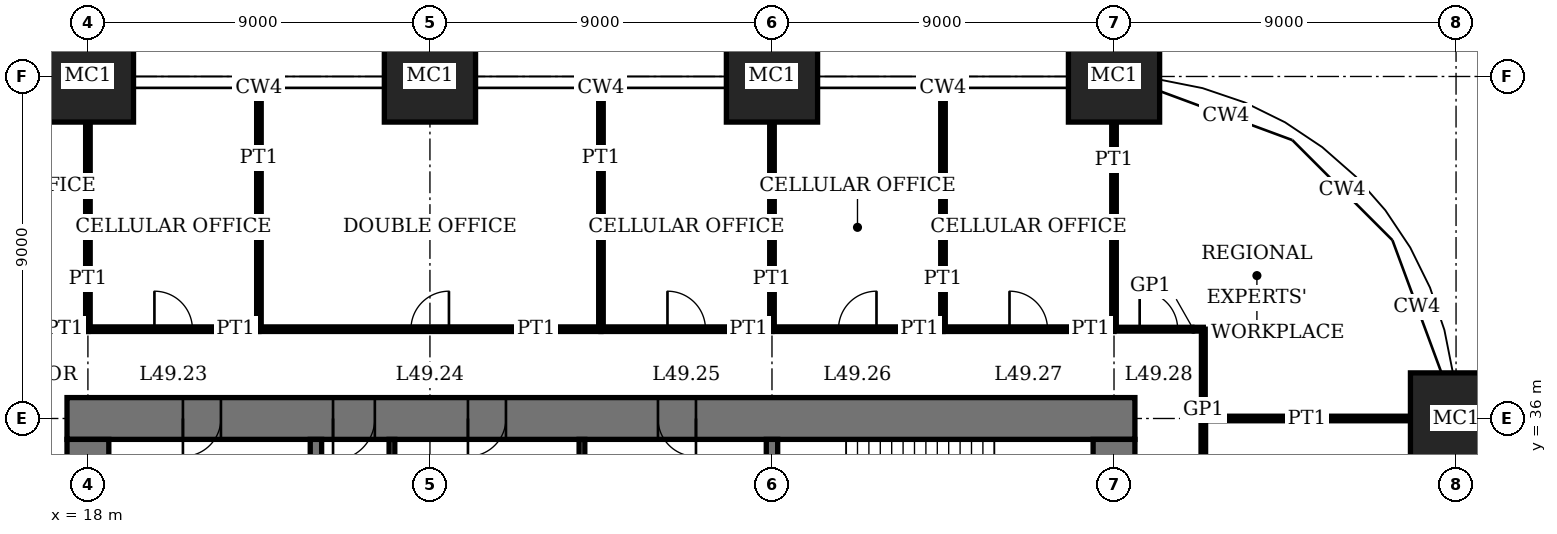
"""IFC4 building model, lengths in metres.
Left out: names, types, materials, properties, quantities, classifications, styles, units other than length and angle.
Written with IfcOpenShell. Run it as: python <this file> out.ifc"""

import sys

from ifc_helpers import new_model, si_unit, direction, frame, frame_2d, origin, origin_2d, place, context, subcontext, project, spatial, rectangle, extrude, element, fill, save


model = new_model("IFC4")
c1 = context("Model", 3, precision=1e-05, world=origin(), true_north=direction((0.0, 1.0)))
c2 = subcontext(c1, "Body", "Model", "MODEL_VIEW")
j1 = project(units=[si_unit("LENGTHUNIT", "METRE"), si_unit("PLANEANGLEUNIT", "RADIAN")], contexts=[c1])
p1 = place(None, origin())
s1 = spatial("IfcSite", under=j1, at=p1, CompositionType="ELEMENT")
p2 = place(p1, origin())
s2 = spatial("IfcBuilding", under=s1, at=p2, CompositionType="ELEMENT")
p3 = place(p2, frame((0.0, 0.0, 202.2)))
s3 = spatial("IfcBuildingStorey", under=s2, at=p3, CompositionType="ELEMENT", Elevation=202.2)
for number, where, z_axis, x_axis in (
    (1, (18.0, 45.0, 0.0), (0.0, 0.0, 1.0), (1.0, 0.0, 0.0)),
    (2, (27.0, 45.0, 0.0), (0.0, 0.0, 1.0), (1.0, 0.0, 0.0)),
    (3, (36.0, 45.0, 0.0), (0.0, 0.0, 1.0), (1.0, 0.0, 0.0)),
    (4, (45.0, 45.0, 0.0), (0.0, 0.0, 1.0), (1.0, 0.0, 0.0)),
    (5, (54.0, 36.0, 0.0), (0.0, 0.0, 1.0), (1.0, 0.0, 0.0)),
):
    element("IfcColumn", number, at=place(p3, frame(where, z_axis=z_axis, x_axis=x_axis)), inside=s3, PredefinedType="COLUMN", context=c2, shape_type="SweptSolid", body=[
        extrude(rectangle(XDim=2.4, YDim=2.4, at=origin_2d()), origin(), (0.0, 0.0, 1.0), 4.0),
    ])
p4 = place(p3, frame((45.55, 36.0, 0.0), z_axis=(0.0, 0.0, 1.0), x_axis=(-1.0, 0.0, 0.0)))
e6 = element("IfcWall", 6, at=p4, inside=s3, PredefinedType="SHEAR", context=c2, shape_type="SweptSolid", body=[
    extrude(rectangle(XDim=28.1, YDim=1.1, at=frame_2d((14.05, 0.0))), origin(), (0.0, 0.0, 1.0), 4.0),
])
p5 = place(p4, frame((11.55, 0.0, 0.0)))
e7 = element("IfcOpeningElement", 7, at=p5, cuts=e6, PredefinedType="OPENING", context=c2, shape_type="SweptSolid", body=[
    extrude(rectangle(XDim=1.0, YDim=2.4, at=frame_2d((0.5, 1.2))), frame((0.0, 0.56, 0.0), z_axis=(0.0, -1.0, 0.0), x_axis=(1.0, 0.0, 0.0)), (0.0, 0.0, 1.0), 1.12),
])
p6 = place(p4, frame((16.55, 0.0, 0.0)))
e8 = element("IfcOpeningElement", 8, at=p6, cuts=e6, PredefinedType="OPENING", context=c2, shape_type="SweptSolid", body=[
    extrude(rectangle(XDim=1.0, YDim=2.4, at=frame_2d((0.5, 1.2))), frame((0.0, 0.56, 0.0), z_axis=(0.0, -1.0, 0.0), x_axis=(1.0, 0.0, 0.0)), (0.0, 0.0, 1.0), 1.12),
])
p7 = place(p4, frame((20.0, 0.0, 0.0)))
e9 = element("IfcOpeningElement", 9, at=p7, cuts=e6, PredefinedType="OPENING", context=c2, shape_type="SweptSolid", body=[
    extrude(rectangle(XDim=1.1, YDim=2.4, at=frame_2d((0.55, 1.2))), frame((0.0, 0.56, 0.0), z_axis=(0.0, -1.0, 0.0), x_axis=(1.0, 0.0, 0.0)), (0.0, 0.0, 1.0), 1.12),
])
p8 = place(p4, frame((24.05, 0.0, 0.0)))
e10 = element("IfcOpeningElement", 10, at=p8, cuts=e6, PredefinedType="OPENING", context=c2, shape_type="SweptSolid", body=[
    extrude(rectangle(XDim=1.0, YDim=2.4, at=frame_2d((0.5, 1.2))), frame((0.0, 0.56, 0.0), z_axis=(0.0, -1.0, 0.0), x_axis=(1.0, 0.0, 0.0)), (0.0, 0.0, 1.0), 1.12),
])
p9 = place(p3, frame((18.0, 35.45, 0.0), z_axis=(0.0, 0.0, 1.0), x_axis=(0.0, -1.0, 0.0)))
e11 = element("IfcWall", 11, at=p9, inside=s3, PredefinedType="SHEAR", context=c2, shape_type="SweptSolid", body=[
    extrude(rectangle(XDim=16.9, YDim=1.1, at=frame_2d((8.45, 0.0))), origin(), (0.0, 0.0, 1.0), 4.0),
])
p10 = place(p9, frame((8.45, 0.0, 0.0)))
e12 = element("IfcOpeningElement", 12, at=p10, cuts=e11, PredefinedType="OPENING", context=c2, shape_type="SweptSolid", body=[
    extrude(rectangle(XDim=1.8, YDim=2.4, at=frame_2d((0.9, 1.2))), frame((0.0, 0.56, 0.0), z_axis=(0.0, -1.0, 0.0), x_axis=(1.0, 0.0, 0.0)), (0.0, 0.0, 1.0), 1.12),
])
p11 = place(p3, frame((45.0, 18.55, 0.0), z_axis=(0.0, 0.0, 1.0), x_axis=(0.0, 1.0, 0.0)))
e13 = element("IfcWall", 13, at=p11, inside=s3, PredefinedType="SHEAR", context=c2, shape_type="SweptSolid", body=[
    extrude(rectangle(XDim=16.9, YDim=1.1, at=frame_2d((8.45, 0.0))), origin(), (0.0, 0.0, 1.0), 4.0),
])
p12 = place(p11, frame((8.45, 0.0, 0.0)))
e14 = element("IfcOpeningElement", 14, at=p12, cuts=e13, PredefinedType="OPENING", context=c2, shape_type="SweptSolid", body=[
    extrude(rectangle(XDim=1.8, YDim=2.4, at=frame_2d((0.9, 1.2))), frame((0.0, 0.56, 0.0), z_axis=(0.0, -1.0, 0.0), x_axis=(1.0, 0.0, 0.0)), (0.0, 0.0, 1.0), 1.12),
])
p13 = place(p3, frame((36.0, 32.4, 0.0), z_axis=(0.0, 0.0, 1.0), x_axis=(0.0, 1.0, 0.0)))
e15 = element("IfcWall", 15, at=p13, inside=s3, PredefinedType="SHEAR", context=c2, shape_type="SweptSolid", body=[
    extrude(rectangle(XDim=3.05, YDim=0.3, at=frame_2d((1.525, 0.0))), origin(), (0.0, 0.0, 1.0), 4.0),
])
p14 = place(p3, frame((24.0, 29.55, 0.0), z_axis=(0.0, 0.0, 1.0), x_axis=(0.0, 1.0, 0.0)))
e16 = element("IfcWall", 16, at=p14, inside=s3, PredefinedType="SHEAR", context=c2, shape_type="SweptSolid", body=[
    extrude(rectangle(XDim=5.9, YDim=0.3, at=frame_2d((2.95, 0.0))), origin(), (0.0, 0.0, 1.0), 4.0),
])
p15 = place(p3, frame((47.35, 36.0, 0.0), z_axis=(0.0, 0.0, 1.0), x_axis=(1.0, 0.0, 0.0)))
e17 = element("IfcWall", 17, at=p15, inside=s3, PredefinedType="PARTITIONING", context=c2, shape_type="SweptSolid", body=[
    extrude(rectangle(XDim=5.45, YDim=0.12, at=frame_2d((2.725, 0.0))), origin(), (0.0, 0.0, 1.0), 3.05),
])
p16 = place(p3, frame((13.25, 38.35, 0.0), z_axis=(0.0, 0.0, 1.0), x_axis=(1.0, 0.0, 0.0)))
e18 = element("IfcWall", 18, at=p16, inside=s3, PredefinedType="PARTITIONING", context=c2, shape_type="SweptSolid", body=[
    extrude(rectangle(XDim=4.75, YDim=0.12, at=frame_2d((2.375, 0.0))), origin(), (0.0, 0.0, 1.0), 3.75),
])
p17 = place(p16, frame((1.875, 0.0, 0.0)))
e19 = element("IfcOpeningElement", 19, at=p17, cuts=e18, PredefinedType="OPENING", context=c2, shape_type="SweptSolid", body=[
    extrude(rectangle(XDim=1.0, YDim=2.4, at=frame_2d((0.5, 1.2))), frame((0.0, 0.07, 0.0), z_axis=(0.0, -1.0, 0.0), x_axis=(1.0, 0.0, 0.0)), (0.0, 0.0, 1.0), 0.14),
])
p18 = place(p3, frame((18.0, 38.35, 0.0), z_axis=(0.0, 0.0, 1.0), x_axis=(1.0, 0.0, 0.0)))
e20 = element("IfcWall", 20, at=p18, inside=s3, PredefinedType="PARTITIONING", context=c2, shape_type="SweptSolid", body=[
    extrude(rectangle(XDim=4.5, YDim=0.12, at=frame_2d((2.25, 0.0))), origin(), (0.0, 0.0, 1.0), 3.75),
])
p19 = place(p18, frame((1.75, 0.0, 0.0)))
e21 = element("IfcOpeningElement", 21, at=p19, cuts=e20, PredefinedType="OPENING", context=c2, shape_type="SweptSolid", body=[
    extrude(rectangle(XDim=1.0, YDim=2.4, at=frame_2d((0.5, 1.2))), frame((0.0, 0.07, 0.0), z_axis=(0.0, -1.0, 0.0), x_axis=(1.0, 0.0, 0.0)), (0.0, 0.0, 1.0), 0.14),
])
p20 = place(p3, frame((22.5, 38.35, 0.0), z_axis=(0.0, 0.0, 1.0), x_axis=(1.0, 0.0, 0.0)))
e22 = element("IfcWall", 22, at=p20, inside=s3, PredefinedType="PARTITIONING", context=c2, shape_type="SweptSolid", body=[
    extrude(rectangle(XDim=9.0, YDim=0.12, at=frame_2d((4.5, 0.0))), origin(), (0.0, 0.0, 1.0), 3.75),
])
p21 = place(p20, frame((4.0, 0.0, 0.0)))
e23 = element("IfcOpeningElement", 23, at=p21, cuts=e22, PredefinedType="OPENING", context=c2, shape_type="SweptSolid", body=[
    extrude(rectangle(XDim=1.0, YDim=2.4, at=frame_2d((0.5, 1.2))), frame((0.0, 0.07, 0.0), z_axis=(0.0, -1.0, 0.0), x_axis=(1.0, 0.0, 0.0)), (0.0, 0.0, 1.0), 0.14),
])
p22 = place(p3, frame((31.5, 38.35, 0.0), z_axis=(0.0, 0.0, 1.0), x_axis=(1.0, 0.0, 0.0)))
e24 = element("IfcWall", 24, at=p22, inside=s3, PredefinedType="PARTITIONING", context=c2, shape_type="SweptSolid", body=[
    extrude(rectangle(XDim=4.5, YDim=0.12, at=frame_2d((2.25, 0.0))), origin(), (0.0, 0.0, 1.0), 3.75),
])
p23 = place(p22, frame((1.75, 0.0, 0.0)))
e25 = element("IfcOpeningElement", 25, at=p23, cuts=e24, PredefinedType="OPENING", context=c2, shape_type="SweptSolid", body=[
    extrude(rectangle(XDim=1.0, YDim=2.4, at=frame_2d((0.5, 1.2))), frame((0.0, 0.07, 0.0), z_axis=(0.0, -1.0, 0.0), x_axis=(1.0, 0.0, 0.0)), (0.0, 0.0, 1.0), 0.14),
])
p24 = place(p3, frame((36.0, 38.35, 0.0), z_axis=(0.0, 0.0, 1.0), x_axis=(1.0, 0.0, 0.0)))
e26 = element("IfcWall", 26, at=p24, inside=s3, PredefinedType="PARTITIONING", context=c2, shape_type="SweptSolid", body=[
    extrude(rectangle(XDim=4.5, YDim=0.12, at=frame_2d((2.25, 0.0))), origin(), (0.0, 0.0, 1.0), 3.75),
])
p25 = place(p24, frame((1.75, 0.0, 0.0)))
e27 = element("IfcOpeningElement", 27, at=p25, cuts=e26, PredefinedType="OPENING", context=c2, shape_type="SweptSolid", body=[
    extrude(rectangle(XDim=1.0, YDim=2.4, at=frame_2d((0.5, 1.2))), frame((0.0, 0.07, 0.0), z_axis=(0.0, -1.0, 0.0), x_axis=(1.0, 0.0, 0.0)), (0.0, 0.0, 1.0), 0.14),
])
p26 = place(p3, frame((40.5, 38.35, 0.0), z_axis=(0.0, 0.0, 1.0), x_axis=(1.0, 0.0, 0.0)))
e28 = element("IfcWall", 28, at=p26, inside=s3, PredefinedType="PARTITIONING", context=c2, shape_type="SweptSolid", body=[
    extrude(rectangle(XDim=4.5, YDim=0.12, at=frame_2d((2.25, 0.0))), origin(), (0.0, 0.0, 1.0), 3.75),
])
p27 = place(p26, frame((1.75, 0.0, 0.0)))
e29 = element("IfcOpeningElement", 29, at=p27, cuts=e28, PredefinedType="OPENING", context=c2, shape_type="SweptSolid", body=[
    extrude(rectangle(XDim=1.0, YDim=2.4, at=frame_2d((0.5, 1.2))), frame((0.0, 0.07, 0.0), z_axis=(0.0, -1.0, 0.0), x_axis=(1.0, 0.0, 0.0)), (0.0, 0.0, 1.0), 0.14),
])
p28 = place(p3, frame((45.0, 38.35, 0.0), z_axis=(0.0, 0.0, 1.0), x_axis=(1.0, 0.0, 0.0)))
e30 = element("IfcWall", 30, at=p28, inside=s3, PredefinedType="PARTITIONING", context=c2, shape_type="SweptSolid", body=[
    extrude(rectangle(XDim=2.35, YDim=0.1, at=frame_2d((1.175, 0.0))), origin(), (0.0, 0.0, 1.0), 3.75),
])
p29 = place(p28, frame((0.675, 0.0, 0.0)))
e31 = element("IfcOpeningElement", 31, at=p29, cuts=e30, PredefinedType="OPENING", context=c2, shape_type="SweptSolid", body=[
    extrude(rectangle(XDim=1.0, YDim=2.4, at=frame_2d((0.5, 1.2))), frame((0.0, 0.06, 0.0), z_axis=(0.0, -1.0, 0.0), x_axis=(1.0, 0.0, 0.0)), (0.0, 0.0, 1.0), 0.12),
])
p30 = place(p3, frame((18.0, 38.35, 0.0), z_axis=(0.0, 0.0, 1.0), x_axis=(0.0, 1.0, 0.0)))
e32 = element("IfcWall", 32, at=p30, inside=s3, PredefinedType="PARTITIONING", context=c2, shape_type="SweptSolid", body=[
    extrude(rectangle(XDim=5.45, YDim=0.12, at=frame_2d((2.725, 0.0))), origin(), (0.0, 0.0, 1.0), 3.05),
])
for number, where, z_axis, x_axis in (
    (33, (22.5, 38.35, 0.0), (0.0, 0.0, 1.0), (0.0, 1.0, 0.0)),
    (34, (31.5, 38.35, 0.0), (0.0, 0.0, 1.0), (0.0, 1.0, 0.0)),
):
    element("IfcWall", number, at=place(p3, frame(where, z_axis=z_axis, x_axis=x_axis)), inside=s3, PredefinedType="PARTITIONING", context=c2, shape_type="SweptSolid", body=[
        extrude(rectangle(XDim=6.34, YDim=0.12, at=frame_2d((3.17, 0.0))), origin(), (0.0, 0.0, 1.0), 3.75),
    ])
p31 = place(p3, frame((36.0, 38.35, 0.0), z_axis=(0.0, 0.0, 1.0), x_axis=(0.0, 1.0, 0.0)))
e35 = element("IfcWall", 35, at=p31, inside=s3, PredefinedType="PARTITIONING", context=c2, shape_type="SweptSolid", body=[
    extrude(rectangle(XDim=5.45, YDim=0.12, at=frame_2d((2.725, 0.0))), origin(), (0.0, 0.0, 1.0), 3.05),
])
p32 = place(p3, frame((40.5, 38.35, 0.0), z_axis=(0.0, 0.0, 1.0), x_axis=(0.0, 1.0, 0.0)))
e36 = element("IfcWall", 36, at=p32, inside=s3, PredefinedType="PARTITIONING", context=c2, shape_type="SweptSolid", body=[
    extrude(rectangle(XDim=6.34, YDim=0.12, at=frame_2d((3.17, 0.0))), origin(), (0.0, 0.0, 1.0), 3.75),
])
p33 = place(p3, frame((45.0, 38.35, 0.0), z_axis=(0.0, 0.0, 1.0), x_axis=(0.0, 1.0, 0.0)))
e37 = element("IfcWall", 37, at=p33, inside=s3, PredefinedType="PARTITIONING", context=c2, shape_type="SweptSolid", body=[
    extrude(rectangle(XDim=5.45, YDim=0.12, at=frame_2d((2.725, 0.0))), origin(), (0.0, 0.0, 1.0), 3.05),
])
p34 = place(p3, frame((47.35, 27.0, 0.0), z_axis=(0.0, 0.0, 1.0), x_axis=(0.0, 1.0, 0.0)))
e38 = element("IfcWall", 38, at=p34, inside=s3, PredefinedType="PARTITIONING", context=c2, shape_type="SweptSolid", body=[
    extrude(rectangle(XDim=9.0, YDim=0.12, at=frame_2d((4.5, 0.0))), origin(), (0.0, 0.0, 1.0), 3.75),
])
p35 = place(p34, frame((4.0, 0.0, 0.0)))
e39 = element("IfcOpeningElement", 39, at=p35, cuts=e38, PredefinedType="OPENING", context=c2, shape_type="SweptSolid", body=[
    extrude(rectangle(XDim=1.0, YDim=2.4, at=frame_2d((0.5, 1.2))), frame((0.0, 0.07, 0.0), z_axis=(0.0, -1.0, 0.0), x_axis=(1.0, 0.0, 0.0)), (0.0, 0.0, 1.0), 0.14),
])
p36 = place(p3, frame((47.35, 36.0, 0.0), z_axis=(0.0, 0.0, 1.0), x_axis=(0.0, 1.0, 0.0)))
e40 = element("IfcWall", 40, at=p36, inside=s3, PredefinedType="PARTITIONING", context=c2, shape_type="SweptSolid", body=[
    extrude(rectangle(XDim=2.35, YDim=0.1, at=frame_2d((1.175, 0.0))), origin(), (0.0, 0.0, 1.0), 3.75),
])
for number, where, z_axis, x_axis in (
    (41, (31.0, 32.55, 0.0), (0.0, 0.0, 1.0), (0.0, 1.0, 0.0)),
    (42, (26.0, 32.55, 0.0), (0.0, 0.0, 1.0), (0.0, 1.0, 0.0)),
):
    element("IfcWall", number, at=place(p3, frame(where, z_axis=z_axis, x_axis=x_axis)), inside=s3, PredefinedType="PARTITIONING", context=c2, shape_type="SweptSolid", body=[
        extrude(rectangle(XDim=2.9, YDim=0.15, at=frame_2d((1.45, 0.0))), origin(), (0.0, 0.0, 1.0), 3.75),
    ])
p37 = place(p5, origin())
e43 = element("IfcDoor", 43, at=p37, inside=s3, OperationType="SINGLE_SWING_RIGHT", PredefinedType="DOOR", context=c2, shape_type="SweptSolid", body=[
    extrude(rectangle(XDim=1.0, YDim=2.4, at=frame_2d((0.5, 1.2))), frame((0.0, 0.025, 0.0), z_axis=(0.0, -1.0, 0.0), x_axis=(1.0, 0.0, 0.0)), (0.0, 0.0, 1.0), 0.05),
    extrude(rectangle(XDim=0.04, YDim=2.4, at=frame_2d((0.02, 1.2))), frame((0.0, 0.4, 0.0), z_axis=(0.0, -1.0, 0.0), x_axis=(1.0, 0.0, 0.0)), (0.0, 0.0, 1.0), 0.8),
    extrude(rectangle(XDim=0.04, YDim=2.4, at=frame_2d((0.98, 1.2))), frame((0.0, 0.4, 0.0), z_axis=(0.0, -1.0, 0.0), x_axis=(1.0, 0.0, 0.0)), (0.0, 0.0, 1.0), 0.8),
    extrude(rectangle(XDim=1.0, YDim=0.04, at=frame_2d((0.5, 2.38))), frame((0.0, 0.4, 0.0), z_axis=(0.0, -1.0, 0.0), x_axis=(1.0, 0.0, 0.0)), (0.0, 0.0, 1.0), 0.8),
])
fill(e7, e43)
p38 = place(p6, origin())
e44 = element("IfcDoor", 44, at=p38, inside=s3, OperationType="SINGLE_SWING_LEFT", PredefinedType="DOOR", context=c2, shape_type="SweptSolid", body=[
    extrude(rectangle(XDim=1.0, YDim=2.4, at=frame_2d((0.5, 1.2))), frame((0.0, 0.025, 0.0), z_axis=(0.0, -1.0, 0.0), x_axis=(1.0, 0.0, 0.0)), (0.0, 0.0, 1.0), 0.05),
    extrude(rectangle(XDim=0.04, YDim=2.4, at=frame_2d((0.02, 1.2))), frame((0.0, 0.4, 0.0), z_axis=(0.0, -1.0, 0.0), x_axis=(1.0, 0.0, 0.0)), (0.0, 0.0, 1.0), 0.8),
    extrude(rectangle(XDim=0.04, YDim=2.4, at=frame_2d((0.98, 1.2))), frame((0.0, 0.4, 0.0), z_axis=(0.0, -1.0, 0.0), x_axis=(1.0, 0.0, 0.0)), (0.0, 0.0, 1.0), 0.8),
    extrude(rectangle(XDim=1.0, YDim=0.04, at=frame_2d((0.5, 2.38))), frame((0.0, 0.4, 0.0), z_axis=(0.0, -1.0, 0.0), x_axis=(1.0, 0.0, 0.0)), (0.0, 0.0, 1.0), 0.8),
])
fill(e8, e44)
p39 = place(p7, origin())
e45 = element("IfcDoor", 45, at=p39, inside=s3, OperationType="SINGLE_SWING_LEFT", PredefinedType="DOOR", context=c2, shape_type="SweptSolid", body=[
    extrude(rectangle(XDim=1.1, YDim=2.4, at=frame_2d((0.55, 1.2))), frame((0.0, 0.025, 0.0), z_axis=(0.0, -1.0, 0.0), x_axis=(1.0, 0.0, 0.0)), (0.0, 0.0, 1.0), 0.05),
    extrude(rectangle(XDim=0.04, YDim=2.4, at=frame_2d((0.02, 1.2))), frame((0.0, 0.44, 0.0), z_axis=(0.0, -1.0, 0.0), x_axis=(1.0, 0.0, 0.0)), (0.0, 0.0, 1.0), 0.88),
    extrude(rectangle(XDim=0.04, YDim=2.4, at=frame_2d((1.08, 1.2))), frame((0.0, 0.44, 0.0), z_axis=(0.0, -1.0, 0.0), x_axis=(1.0, 0.0, 0.0)), (0.0, 0.0, 1.0), 0.88),
    extrude(rectangle(XDim=1.1, YDim=0.04, at=frame_2d((0.55, 2.38))), frame((0.0, 0.44, 0.0), z_axis=(0.0, -1.0, 0.0), x_axis=(1.0, 0.0, 0.0)), (0.0, 0.0, 1.0), 0.88),
])
fill(e9, e45)
p40 = place(p8, origin())
e46 = element("IfcDoor", 46, at=p40, inside=s3, OperationType="SINGLE_SWING_LEFT", PredefinedType="DOOR", context=c2, shape_type="SweptSolid", body=[
    extrude(rectangle(XDim=1.0, YDim=2.4, at=frame_2d((0.5, 1.2))), frame((0.0, 0.025, 0.0), z_axis=(0.0, -1.0, 0.0), x_axis=(1.0, 0.0, 0.0)), (0.0, 0.0, 1.0), 0.05),
    extrude(rectangle(XDim=0.04, YDim=2.4, at=frame_2d((0.02, 1.2))), frame((0.0, 0.4, 0.0), z_axis=(0.0, -1.0, 0.0), x_axis=(1.0, 0.0, 0.0)), (0.0, 0.0, 1.0), 0.8),
    extrude(rectangle(XDim=0.04, YDim=2.4, at=frame_2d((0.98, 1.2))), frame((0.0, 0.4, 0.0), z_axis=(0.0, -1.0, 0.0), x_axis=(1.0, 0.0, 0.0)), (0.0, 0.0, 1.0), 0.8),
    extrude(rectangle(XDim=1.0, YDim=0.04, at=frame_2d((0.5, 2.38))), frame((0.0, 0.4, 0.0), z_axis=(0.0, -1.0, 0.0), x_axis=(1.0, 0.0, 0.0)), (0.0, 0.0, 1.0), 0.8),
])
fill(e10, e46)
p41 = place(p19, origin())
e47 = element("IfcDoor", 47, at=p41, inside=s3, OperationType="SINGLE_SWING_RIGHT", PredefinedType="DOOR", context=c2, shape_type="SweptSolid", body=[
    extrude(rectangle(XDim=1.0, YDim=2.4, at=frame_2d((0.5, 1.2))), frame((0.0, 0.025, 0.0), z_axis=(0.0, -1.0, 0.0), x_axis=(1.0, 0.0, 0.0)), (0.0, 0.0, 1.0), 0.05),
])
fill(e21, e47)
p42 = place(p21, origin())
e48 = element("IfcDoor", 48, at=p42, inside=s3, OperationType="SINGLE_SWING_LEFT", PredefinedType="DOOR", context=c2, shape_type="SweptSolid", body=[
    extrude(rectangle(XDim=1.0, YDim=2.4, at=frame_2d((0.5, 1.2))), frame((0.0, 0.025, 0.0), z_axis=(0.0, -1.0, 0.0), x_axis=(1.0, 0.0, 0.0)), (0.0, 0.0, 1.0), 0.05),
])
fill(e23, e48)
p43 = place(p23, origin())
e49 = element("IfcDoor", 49, at=p43, inside=s3, OperationType="SINGLE_SWING_RIGHT", PredefinedType="DOOR", context=c2, shape_type="SweptSolid", body=[
    extrude(rectangle(XDim=1.0, YDim=2.4, at=frame_2d((0.5, 1.2))), frame((0.0, 0.025, 0.0), z_axis=(0.0, -1.0, 0.0), x_axis=(1.0, 0.0, 0.0)), (0.0, 0.0, 1.0), 0.05),
])
fill(e25, e49)
p44 = place(p25, origin())
e50 = element("IfcDoor", 50, at=p44, inside=s3, OperationType="SINGLE_SWING_LEFT", PredefinedType="DOOR", context=c2, shape_type="SweptSolid", body=[
    extrude(rectangle(XDim=1.0, YDim=2.4, at=frame_2d((0.5, 1.2))), frame((0.0, 0.025, 0.0), z_axis=(0.0, -1.0, 0.0), x_axis=(1.0, 0.0, 0.0)), (0.0, 0.0, 1.0), 0.05),
])
fill(e27, e50)
p45 = place(p27, origin())
e51 = element("IfcDoor", 51, at=p45, inside=s3, OperationType="SINGLE_SWING_RIGHT", PredefinedType="DOOR", context=c2, shape_type="SweptSolid", body=[
    extrude(rectangle(XDim=1.0, YDim=2.4, at=frame_2d((0.5, 1.2))), frame((0.0, 0.025, 0.0), z_axis=(0.0, -1.0, 0.0), x_axis=(1.0, 0.0, 0.0)), (0.0, 0.0, 1.0), 0.05),
])
fill(e29, e51)
p46 = place(p29, origin())
e52 = element("IfcDoor", 52, at=p46, inside=s3, OperationType="SINGLE_SWING_RIGHT", PredefinedType="DOOR", context=c2, shape_type="SweptSolid", body=[
    extrude(rectangle(XDim=1.0, YDim=2.4, at=frame_2d((0.5, 1.2))), frame((0.0, 0.02, 0.0), z_axis=(0.0, -1.0, 0.0), x_axis=(1.0, 0.0, 0.0)), (0.0, 0.0, 1.0), 0.04),
])
fill(e31, e52)
save(model, sys.argv[1])
